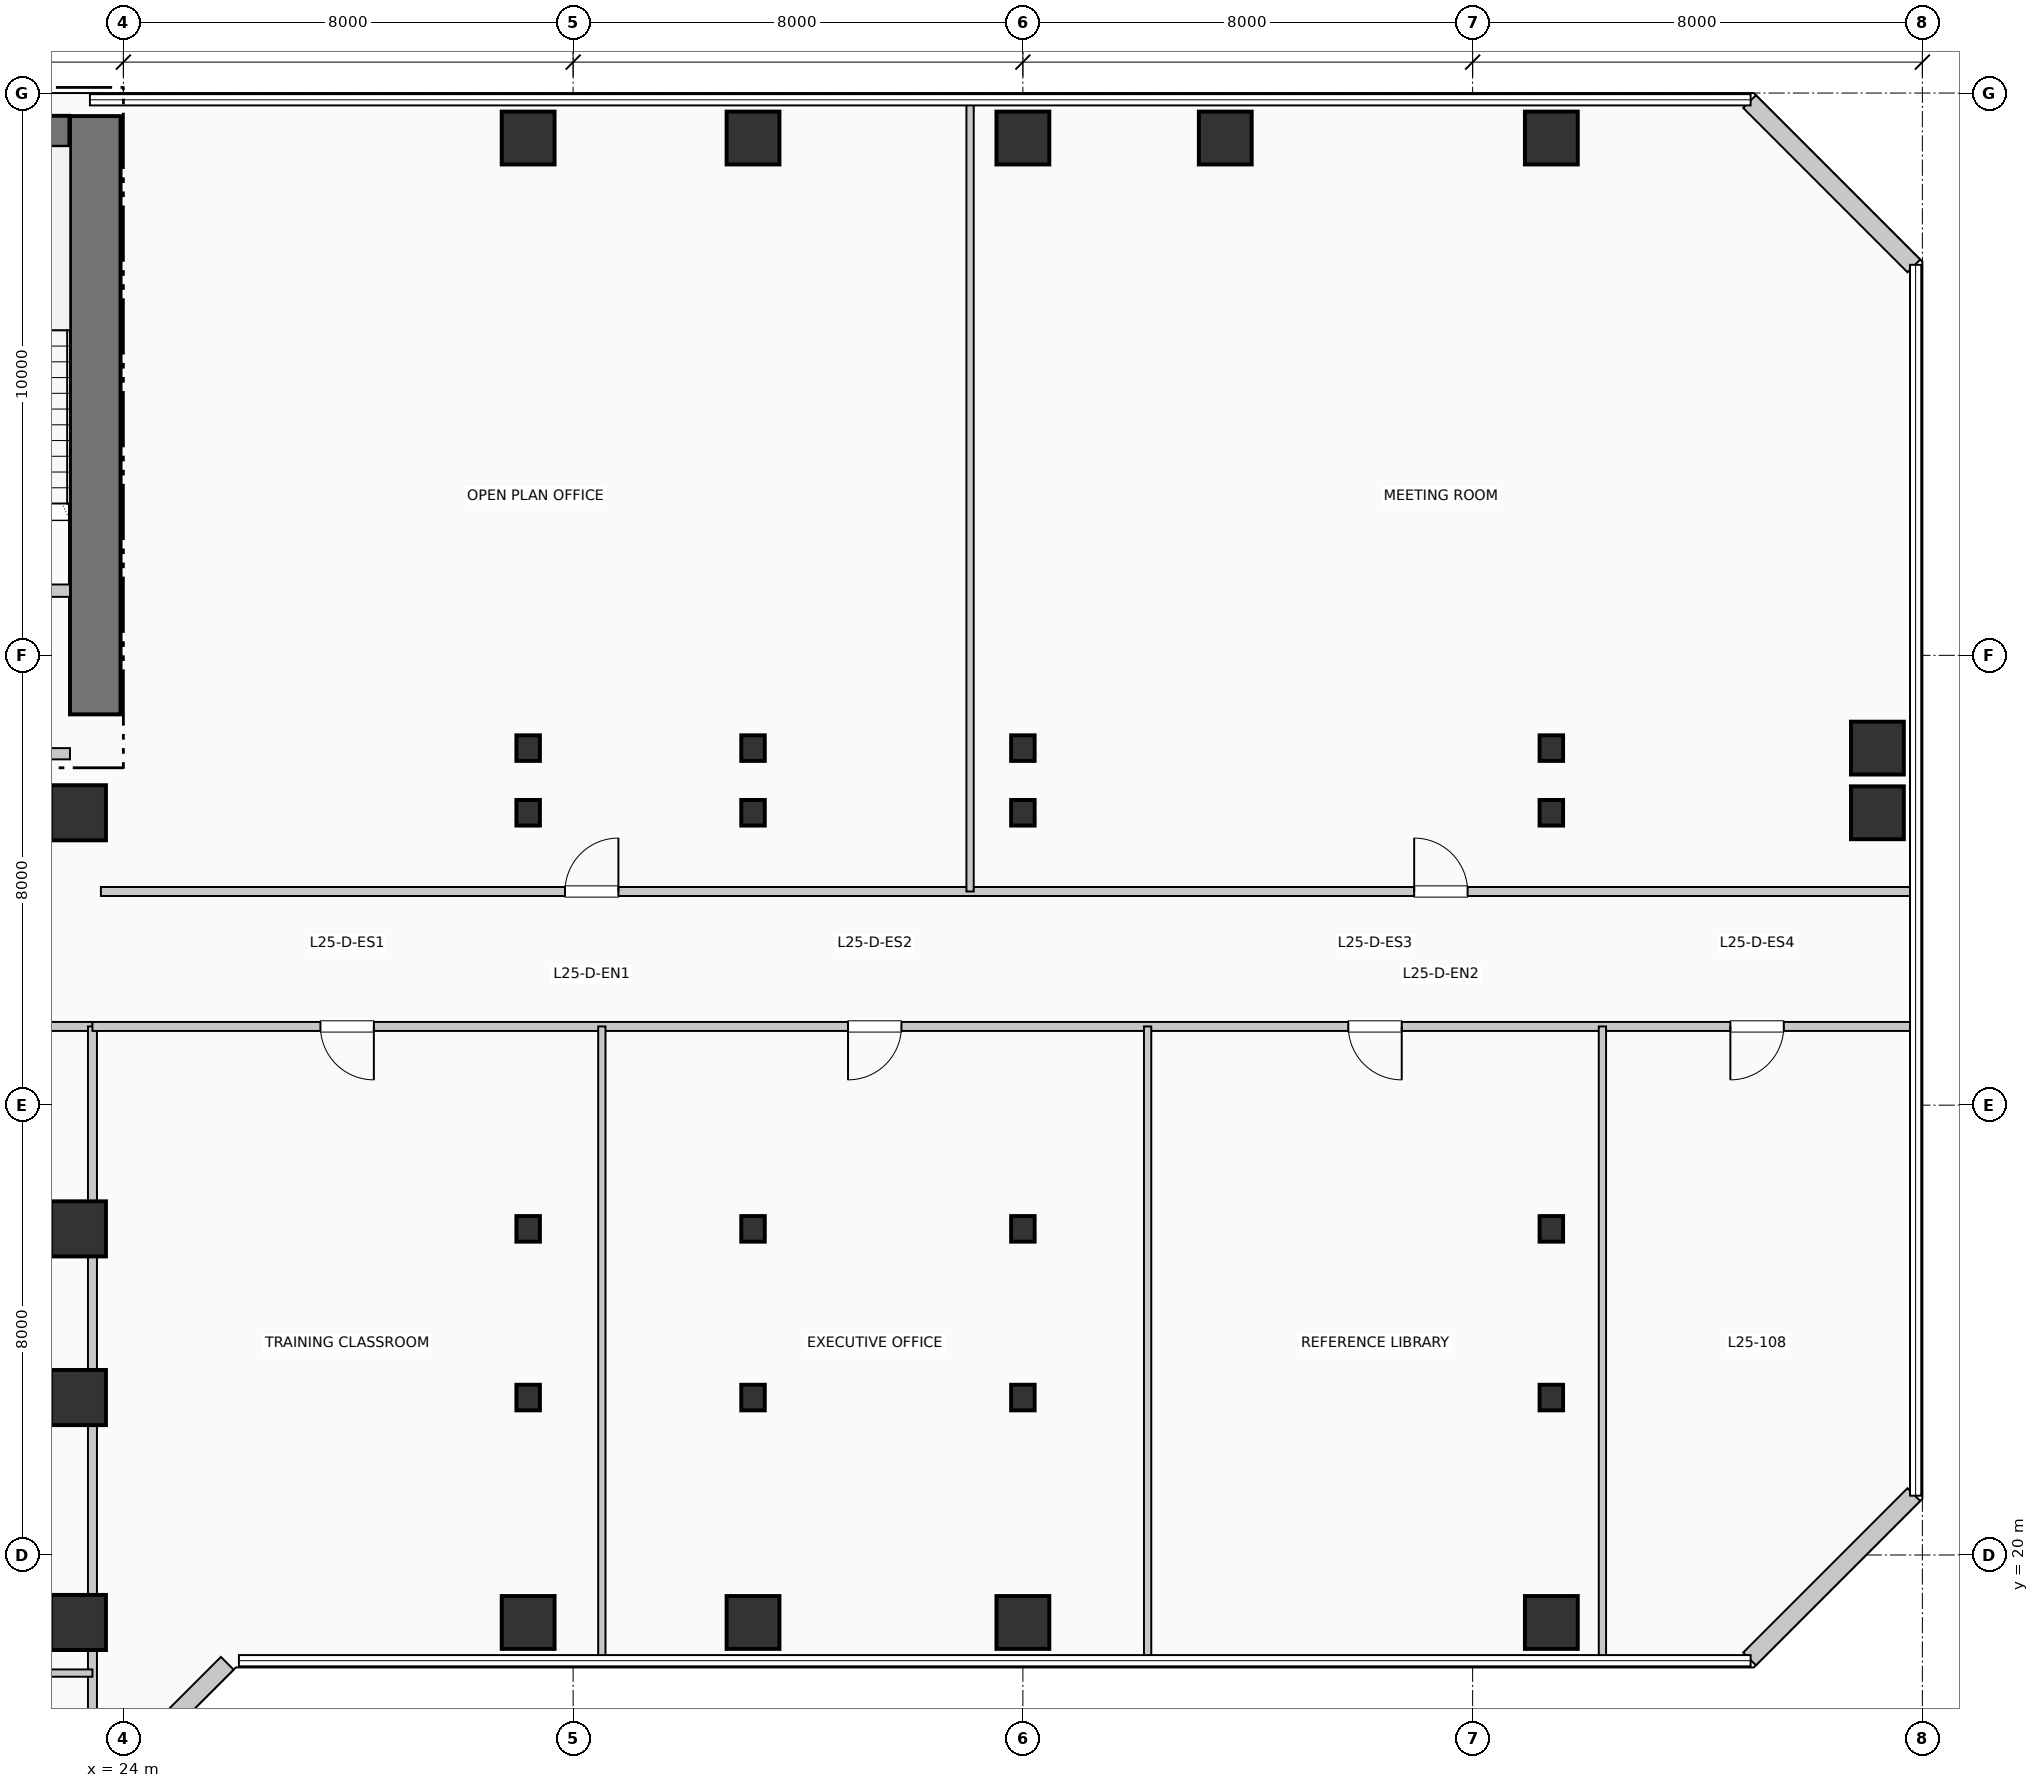
"""IFC4 building model, lengths in metres.
Left out: names, types, materials, properties, quantities, classifications, styles, units other than length and angle.
Written with IfcOpenShell. Run it as: python <this file> out.ifc"""

import sys

from ifc_helpers import new_model, si_unit, direction, frame, frame_2d, origin, origin_2d, place, context, subcontext, project, spatial, rectangle, i_section, extrude, element, fill, save


model = new_model("IFC4")
c1 = context("Model", 3, precision=1e-05, world=origin(), true_north=direction((0.0, 1.0)))
c2 = subcontext(c1, "Body", "Model", "MODEL_VIEW")
j1 = project(units=[si_unit("LENGTHUNIT", "METRE"), si_unit("PLANEANGLEUNIT", "RADIAN")], contexts=[c1])
p1 = place(None, origin())
s1 = spatial("IfcSite", under=j1, at=p1, CompositionType="ELEMENT")
p2 = place(p1, origin())
s2 = spatial("IfcBuilding", under=s1, at=p2, CompositionType="ELEMENT")
p3 = place(p2, frame((0.0, 0.0, 106.59)))
s3 = spatial("IfcBuildingStorey", under=s2, at=p3, CompositionType="ELEMENT", Elevation=106.59)
p4 = place(p3, frame((23.5, 34.95, 0.0), z_axis=(0.0, 0.0, 1.0), x_axis=(0.0, 1.0, 0.0)))
e1 = element("IfcWall", 1, at=p4, inside=s3, PredefinedType="SHEAR", context=c2, shape_type="SweptSolid", body=[
    extrude(rectangle(XDim=10.64, YDim=0.9, at=frame_2d((5.32, 0.0))), origin(), (0.0, 0.0, 1.0), 3.96),
])
p5 = place(p3, frame((19.35, 45.32, 0.0), z_axis=(0.0, 0.0, 1.0), x_axis=(1.0, 0.0, 0.0)))
e2 = element("IfcWall", 2, at=p5, inside=s3, PredefinedType="SHEAR", context=c2, shape_type="SweptSolid", body=[
    extrude(rectangle(XDim=3.69, YDim=0.55, at=frame_2d((1.845, 0.0))), origin(), (0.0, 0.0, 1.0), 3.96),
])
p6 = place(p5, frame((1.15, 0.0, 1.05)))
e3 = element("IfcOpeningElement", 3, at=p6, cuts=e2, PredefinedType="OPENING", context=c2, shape_type="SweptSolid", body=[
    extrude(rectangle(XDim=1.4, YDim=1.8, at=frame_2d((0.7, 0.9))), frame((0.0, 0.285, 0.0), z_axis=(0.0, -1.0, 0.0), x_axis=(1.0, 0.0, 0.0)), (0.0, 0.0, 1.0), 0.57),
])
for number, where, z_axis, x_axis in (
    (4, (23.2, 18.8, 0.0), (0.0, 0.0, 1.0), (1.0, 0.0, 0.0)),
    (5, (23.2, 22.8, 0.0), (0.0, 0.0, 1.0), (1.0, 0.0, 0.0)),
    (6, (23.2, 25.8, 0.0), (0.0, 0.0, 1.0), (1.0, 0.0, 0.0)),
    (7, (23.2, 33.2, 0.0), (0.0, 0.0, 1.0), (1.0, 0.0, 0.0)),
):
    element("IfcColumn", number, at=place(p3, frame(where, z_axis=z_axis, x_axis=x_axis)), inside=s3, PredefinedType="COLUMN", context=c2, shape_type="SweptSolid", body=[
        extrude(rectangle(XDim=0.98, YDim=0.98, at=origin_2d()), origin(), (0.0, 0.0, 1.0), 3.96),
    ])
p7 = place(p3, frame((31.2, 18.8, 0.0), z_axis=(0.0, 0.0, 1.0), x_axis=(1.0, 0.0, 0.0)))
e8 = element("IfcColumn", 8, at=p7, inside=s3, PredefinedType="COLUMN", context=c2, shape_type="SweptSolid", body=[
    extrude(rectangle(XDim=0.94, YDim=0.94, at=origin_2d()), origin(), (0.0, 0.0, 1.0), 3.96),
])
for number, where, z_axis, x_axis in (
    (9, (31.2, 22.8, 0.0), (0.0, 0.0, 1.0), (1.0, 0.0, 0.0)),
    (10, (31.2, 25.8, 0.0), (0.0, 0.0, 1.0), (1.0, 0.0, 0.0)),
    (11, (31.2, 33.2, 0.0), (0.0, 0.0, 1.0), (1.0, 0.0, 0.0)),
    (12, (31.2, 34.35, 0.0), (0.0, 0.0, 1.0), (1.0, 0.0, 0.0)),
):
    element("IfcColumn", number, at=place(p3, frame(where, z_axis=z_axis, x_axis=x_axis)), inside=s3, PredefinedType="COLUMN", context=c2, shape_type="SweptSolid", body=[
        extrude(i_section(OverallWidth=0.418, OverallDepth=0.455, WebThickness=0.032, FlangeThickness=0.051, at=origin_2d()), origin(), (0.0, 0.0, 1.0), 3.96),
    ])
for number, where, z_axis, x_axis in (
    (13, (31.2, 45.2, 0.0), (0.0, 0.0, 1.0), (1.0, 0.0, 0.0)),
    (14, (35.2, 18.8, 0.0), (0.0, 0.0, 1.0), (1.0, 0.0, 0.0)),
):
    element("IfcColumn", number, at=place(p3, frame(where, z_axis=z_axis, x_axis=x_axis)), inside=s3, PredefinedType="COLUMN", context=c2, shape_type="SweptSolid", body=[
        extrude(rectangle(XDim=0.94, YDim=0.94, at=origin_2d()), origin(), (0.0, 0.0, 1.0), 3.96),
    ])
for number, where, z_axis, x_axis in (
    (15, (35.2, 22.8, 0.0), (0.0, 0.0, 1.0), (1.0, 0.0, 0.0)),
    (16, (35.2, 25.8, 0.0), (0.0, 0.0, 1.0), (1.0, 0.0, 0.0)),
    (17, (35.2, 33.2, 0.0), (0.0, 0.0, 1.0), (1.0, 0.0, 0.0)),
    (18, (35.2, 34.35, 0.0), (0.0, 0.0, 1.0), (1.0, 0.0, 0.0)),
):
    element("IfcColumn", number, at=place(p3, frame(where, z_axis=z_axis, x_axis=x_axis)), inside=s3, PredefinedType="COLUMN", context=c2, shape_type="SweptSolid", body=[
        extrude(i_section(OverallWidth=0.418, OverallDepth=0.455, WebThickness=0.032, FlangeThickness=0.051, at=origin_2d()), origin(), (0.0, 0.0, 1.0), 3.96),
    ])
for number, where, z_axis, x_axis in (
    (19, (35.2, 45.2, 0.0), (0.0, 0.0, 1.0), (1.0, 0.0, 0.0)),
    (20, (40.0, 18.8, 0.0), (0.0, 0.0, 1.0), (1.0, 0.0, 0.0)),
):
    element("IfcColumn", number, at=place(p3, frame(where, z_axis=z_axis, x_axis=x_axis)), inside=s3, PredefinedType="COLUMN", context=c2, shape_type="SweptSolid", body=[
        extrude(rectangle(XDim=0.94, YDim=0.94, at=origin_2d()), origin(), (0.0, 0.0, 1.0), 3.96),
    ])
for number, where, z_axis, x_axis in (
    (21, (40.0, 22.8, 0.0), (0.0, 0.0, 1.0), (1.0, 0.0, 0.0)),
    (22, (40.0, 25.8, 0.0), (0.0, 0.0, 1.0), (1.0, 0.0, 0.0)),
    (23, (40.0, 33.2, 0.0), (0.0, 0.0, 1.0), (1.0, 0.0, 0.0)),
    (24, (40.0, 34.35, 0.0), (0.0, 0.0, 1.0), (1.0, 0.0, 0.0)),
):
    element("IfcColumn", number, at=place(p3, frame(where, z_axis=z_axis, x_axis=x_axis)), inside=s3, PredefinedType="COLUMN", context=c2, shape_type="SweptSolid", body=[
        extrude(i_section(OverallWidth=0.418, OverallDepth=0.455, WebThickness=0.032, FlangeThickness=0.051, at=origin_2d()), origin(), (0.0, 0.0, 1.0), 3.96),
    ])
for number, where, z_axis, x_axis in (
    (25, (40.0, 45.2, 0.0), (0.0, 0.0, 1.0), (1.0, 0.0, 0.0)),
    (26, (43.6, 45.2, 0.0), (0.0, 0.0, 1.0), (1.0, 0.0, 0.0)),
    (27, (49.4, 18.8, 0.0), (0.0, 0.0, 1.0), (1.0, 0.0, 0.0)),
):
    element("IfcColumn", number, at=place(p3, frame(where, z_axis=z_axis, x_axis=x_axis)), inside=s3, PredefinedType="COLUMN", context=c2, shape_type="SweptSolid", body=[
        extrude(rectangle(XDim=0.94, YDim=0.94, at=origin_2d()), origin(), (0.0, 0.0, 1.0), 3.96),
    ])
for number, where, z_axis, x_axis in (
    (28, (49.4, 22.8, 0.0), (0.0, 0.0, 1.0), (1.0, 0.0, 0.0)),
    (29, (49.4, 25.8, 0.0), (0.0, 0.0, 1.0), (1.0, 0.0, 0.0)),
    (30, (49.4, 33.2, 0.0), (0.0, 0.0, 1.0), (1.0, 0.0, 0.0)),
    (31, (49.4, 34.35, 0.0), (0.0, 0.0, 1.0), (1.0, 0.0, 0.0)),
):
    element("IfcColumn", number, at=place(p3, frame(where, z_axis=z_axis, x_axis=x_axis)), inside=s3, PredefinedType="COLUMN", context=c2, shape_type="SweptSolid", body=[
        extrude(i_section(OverallWidth=0.418, OverallDepth=0.455, WebThickness=0.032, FlangeThickness=0.051, at=origin_2d()), origin(), (0.0, 0.0, 1.0), 3.96),
    ])
for number, where, z_axis, x_axis in (
    (32, (49.4, 45.2, 0.0), (0.0, 0.0, 1.0), (1.0, 0.0, 0.0)),
    (33, (55.2, 33.2, 0.0), (0.0, 0.0, 1.0), (1.0, 0.0, 0.0)),
    (34, (55.2, 34.35, 0.0), (0.0, 0.0, 1.0), (1.0, 0.0, 0.0)),
):
    element("IfcColumn", number, at=place(p3, frame(where, z_axis=z_axis, x_axis=x_axis)), inside=s3, PredefinedType="COLUMN", context=c2, shape_type="SweptSolid", body=[
        extrude(rectangle(XDim=0.94, YDim=0.94, at=origin_2d()), origin(), (0.0, 0.0, 1.0), 3.96),
    ])
p8 = place(p3, frame((23.926, 16.152, 0.0), z_axis=(0.0, 0.0, 1.0), x_axis=(0.707106781187, 0.707106781187, 0.0)))
e35 = element("IfcWall", 35, at=p8, inside=s3, PredefinedType="SOLIDWALL", context=c2, shape_type="SweptSolid", body=[
    extrude(rectangle(XDim=2.718, YDim=0.32, at=frame_2d((1.359, 0.0))), origin(), (0.0, 0.0, 1.0), 3.71),
])
for number, where, z_axis, x_axis in (
    (36, (52.926, 18.152, 0.0), (0.0, 0.0, 1.0), (0.707, 0.707, 0.0)),
    (37, (55.848, 42.926, 0.0), (0.0, 0.0, 1.0), (-0.707, 0.707, 0.0)),
):
    element("IfcWall", number, at=place(p3, frame(where, z_axis=z_axis, x_axis=x_axis)), inside=s3, PredefinedType="SOLIDWALL", context=c2, shape_type="SweptSolid", body=[
        extrude(rectangle(XDim=4.133, YDim=0.32, at=frame_2d((2.066, 0.0))), origin(), (0.0, 0.0, 1.0), 3.71),
    ])
p9 = place(p3, frame((19.9, 37.15, 0.0), z_axis=(0.0, 0.0, 1.0), x_axis=(1.0, 0.0, 0.0)))
e38 = element("IfcWall", 38, at=p9, inside=s3, PredefinedType="PARTITIONING", context=c2, shape_type="SweptSolid", body=[
    extrude(rectangle(XDim=3.15, YDim=0.22, at=frame_2d((1.575, 0.0))), origin(), (0.0, 0.0, 1.0), 3.71),
])
p10 = place(p9, frame((2.05, 0.0, 0.0), z_axis=(0.0, 0.0, 1.0), x_axis=(-1.0, 0.0, 0.0)))
e39 = element("IfcOpeningElement", 39, at=p10, cuts=e38, PredefinedType="OPENING", context=c2, shape_type="SweptSolid", body=[
    extrude(rectangle(XDim=1.05, YDim=2.15, at=frame_2d((0.525, 1.075))), frame((0.0, 0.12, 0.0), z_axis=(0.0, -1.0, 0.0), x_axis=(1.0, 0.0, 0.0)), (0.0, 0.0, 1.0), 0.24),
])
p11 = place(p3, frame((19.8, 34.25, 0.0), z_axis=(0.0, 0.0, 1.0), x_axis=(1.0, 0.0, 0.0)))
e40 = element("IfcWall", 40, at=p11, inside=s3, PredefinedType="PARTITIONING", context=c2, shape_type="SweptSolid", body=[
    extrude(rectangle(XDim=3.25, YDim=0.2, at=frame_2d((1.625, 0.0))), origin(), (0.0, 0.0, 1.0), 3.71),
])
p12 = place(p11, frame((2.15, 0.0, 0.0), z_axis=(0.0, 0.0, 1.0), x_axis=(-1.0, 0.0, 0.0)))
e41 = element("IfcOpeningElement", 41, at=p12, cuts=e40, PredefinedType="OPENING", context=c2, shape_type="SweptSolid", body=[
    extrude(rectangle(XDim=1.1, YDim=2.15, at=frame_2d((0.55, 1.075))), frame((0.0, 0.11, 0.0), z_axis=(0.0, -1.0, 0.0), x_axis=(1.0, 0.0, 0.0)), (0.0, 0.0, 1.0), 0.22),
])
p13 = place(p3, frame((11.64, 29.4, 0.0), z_axis=(0.0, 0.0, 1.0), x_axis=(1.0, 0.0, 0.0)))
e42 = element("IfcWall", 42, at=p13, inside=s3, PredefinedType="PARTITIONING", context=c2, shape_type="SweptSolid", body=[
    extrude(rectangle(XDim=11.81, YDim=0.16, at=frame_2d((5.905, 0.0))), origin(), (0.0, 0.0, 1.0), 3.71),
])
p14 = place(p3, frame((23.45, 0.19, 0.0), z_axis=(0.0, 0.0, 1.0), x_axis=(0.0, 1.0, 0.0)))
e43 = element("IfcWall", 43, at=p14, inside=s3, PredefinedType="PARTITIONING", context=c2, shape_type="SweptSolid", body=[
    extrude(rectangle(XDim=29.21, YDim=0.16, at=frame_2d((14.605, 0.0))), origin(), (0.0, 0.0, 1.0), 2.995),
])
p15 = place(p3, frame((11.64, 17.9, 0.0), z_axis=(0.0, 0.0, 1.0), x_axis=(1.0, 0.0, 0.0)))
e44 = element("IfcWall", 44, at=p15, inside=s3, PredefinedType="PARTITIONING", context=c2, shape_type="SweptSolid", body=[
    extrude(rectangle(XDim=11.81, YDim=0.13, at=frame_2d((5.905, 0.0))), origin(), (0.0, 0.0, 1.0), 3.71),
])
p16 = place(p3, frame((23.45, 29.4, 0.0), z_axis=(0.0, 0.0, 1.0), x_axis=(1.0, 0.0, 0.0)))
e45 = element("IfcWall", 45, at=p16, inside=s3, PredefinedType="PARTITIONING", context=c2, shape_type="SweptSolid", body=[
    extrude(rectangle(XDim=32.36, YDim=0.16, at=frame_2d((16.18, 0.0))), origin(), (0.0, 0.0, 1.0), 3.365),
])
p17 = place(p16, frame((5.005, 0.0, 0.0), z_axis=(0.0, 0.0, 1.0), x_axis=(-1.0, 0.0, 0.0)))
e46 = element("IfcOpeningElement", 46, at=p17, cuts=e45, PredefinedType="OPENING", context=c2, shape_type="SweptSolid", body=[
    extrude(rectangle(XDim=0.95, YDim=2.15, at=frame_2d((0.475, 1.075))), frame((0.0, 0.09, 0.0), z_axis=(0.0, -1.0, 0.0), x_axis=(1.0, 0.0, 0.0)), (0.0, 0.0, 1.0), 0.18),
])
p18 = place(p16, frame((14.39, 0.0, 0.0), z_axis=(0.0, 0.0, 1.0), x_axis=(-1.0, 0.0, 0.0)))
e47 = element("IfcOpeningElement", 47, at=p18, cuts=e45, PredefinedType="OPENING", context=c2, shape_type="SweptSolid", body=[
    extrude(rectangle(XDim=0.95, YDim=2.15, at=frame_2d((0.475, 1.075))), frame((0.0, 0.09, 0.0), z_axis=(0.0, -1.0, 0.0), x_axis=(1.0, 0.0, 0.0)), (0.0, 0.0, 1.0), 0.18),
])
p19 = place(p16, frame((23.289, 0.0, 0.0), z_axis=(0.0, 0.0, 1.0), x_axis=(-1.0, 0.0, 0.0)))
e48 = element("IfcOpeningElement", 48, at=p19, cuts=e45, PredefinedType="OPENING", context=c2, shape_type="SweptSolid", body=[
    extrude(rectangle(XDim=0.95, YDim=2.15, at=frame_2d((0.475, 1.075))), frame((0.0, 0.09, 0.0), z_axis=(0.0, -1.0, 0.0), x_axis=(1.0, 0.0, 0.0)), (0.0, 0.0, 1.0), 0.18),
])
p20 = place(p16, frame((30.084, 0.0, 0.0), z_axis=(0.0, 0.0, 1.0), x_axis=(-1.0, 0.0, 0.0)))
e49 = element("IfcOpeningElement", 49, at=p20, cuts=e45, PredefinedType="OPENING", context=c2, shape_type="SweptSolid", body=[
    extrude(rectangle(XDim=0.95, YDim=2.15, at=frame_2d((0.475, 1.075))), frame((0.0, 0.09, 0.0), z_axis=(0.0, -1.0, 0.0), x_axis=(1.0, 0.0, 0.0)), (0.0, 0.0, 1.0), 0.18),
])
p21 = place(p3, frame((23.6, 31.8, 0.0), z_axis=(0.0, 0.0, 1.0), x_axis=(1.0, 0.0, 0.0)))
e50 = element("IfcWall", 50, at=p21, inside=s3, PredefinedType="PARTITIONING", context=c2, shape_type="SweptSolid", body=[
    extrude(rectangle(XDim=32.21, YDim=0.16, at=frame_2d((16.105, 0.0))), origin(), (0.0, 0.0, 1.0), 3.71),
])
p22 = place(p21, frame((8.255, 0.0, 0.0)))
e51 = element("IfcOpeningElement", 51, at=p22, cuts=e50, PredefinedType="OPENING", context=c2, shape_type="SweptSolid", body=[
    extrude(rectangle(XDim=0.95, YDim=2.15, at=frame_2d((0.475, 1.075))), frame((0.0, 0.09, 0.0), z_axis=(0.0, -1.0, 0.0), x_axis=(1.0, 0.0, 0.0)), (0.0, 0.0, 1.0), 0.18),
])
p23 = place(p21, frame((23.36, 0.0, 0.0)))
e52 = element("IfcOpeningElement", 52, at=p23, cuts=e50, PredefinedType="OPENING", context=c2, shape_type="SweptSolid", body=[
    extrude(rectangle(XDim=0.95, YDim=2.15, at=frame_2d((0.475, 1.075))), frame((0.0, 0.09, 0.0), z_axis=(0.0, -1.0, 0.0), x_axis=(1.0, 0.0, 0.0)), (0.0, 0.0, 1.0), 0.18),
])
for number, where, z_axis, x_axis in (
    (53, (32.511, 18.19, 0.0), (0.0, 0.0, 1.0), (0.0, 1.0, 0.0)),
    (54, (42.219, 18.19, 0.0), (0.0, 0.0, 1.0), (0.0, 1.0, 0.0)),
    (55, (50.309, 18.19, 0.0), (0.0, 0.0, 1.0), (0.0, 1.0, 0.0)),
):
    element("IfcWall", number, at=place(p3, frame(where, z_axis=z_axis, x_axis=x_axis)), inside=s3, PredefinedType="PARTITIONING", context=c2, shape_type="SweptSolid", body=[
        extrude(rectangle(XDim=11.21, YDim=0.13, at=frame_2d((5.605, 0.0))), origin(), (0.0, 0.0, 1.0), 3.71),
    ])
p24 = place(p3, frame((39.061, 31.8, 0.0), z_axis=(0.0, 0.0, 1.0), x_axis=(0.0, 1.0, 0.0)))
e56 = element("IfcWall", 56, at=p24, inside=s3, PredefinedType="PARTITIONING", context=c2, shape_type="SweptSolid", body=[
    extrude(rectangle(XDim=14.01, YDim=0.13, at=frame_2d((7.005, 0.0))), origin(), (0.0, 0.0, 1.0), 3.71),
])
p25 = place(p17, origin())
e57 = element("IfcDoor", 57, at=p25, inside=s3, OperationType="SINGLE_SWING_RIGHT", PredefinedType="DOOR", context=c2, shape_type="SweptSolid", body=[
    extrude(rectangle(XDim=0.95, YDim=2.15, at=frame_2d((0.475, 1.075))), frame((0.0, 0.025, 0.0), z_axis=(0.0, -1.0, 0.0), x_axis=(1.0, 0.0, 0.0)), (0.0, 0.0, 1.0), 0.05),
])
fill(e46, e57)
p26 = place(p18, origin())
e58 = element("IfcDoor", 58, at=p26, inside=s3, OperationType="SINGLE_SWING_LEFT", PredefinedType="DOOR", context=c2, shape_type="SweptSolid", body=[
    extrude(rectangle(XDim=0.95, YDim=2.15, at=frame_2d((0.475, 1.075))), frame((0.0, 0.025, 0.0), z_axis=(0.0, -1.0, 0.0), x_axis=(1.0, 0.0, 0.0)), (0.0, 0.0, 1.0), 0.05),
])
fill(e47, e58)
p27 = place(p19, origin())
e59 = element("IfcDoor", 59, at=p27, inside=s3, OperationType="SINGLE_SWING_RIGHT", PredefinedType="DOOR", context=c2, shape_type="SweptSolid", body=[
    extrude(rectangle(XDim=0.95, YDim=2.15, at=frame_2d((0.475, 1.075))), frame((0.0, 0.025, 0.0), z_axis=(0.0, -1.0, 0.0), x_axis=(1.0, 0.0, 0.0)), (0.0, 0.0, 1.0), 0.05),
])
fill(e48, e59)
p28 = place(p20, origin())
e60 = element("IfcDoor", 60, at=p28, inside=s3, OperationType="SINGLE_SWING_LEFT", PredefinedType="DOOR", context=c2, shape_type="SweptSolid", body=[
    extrude(rectangle(XDim=0.95, YDim=2.15, at=frame_2d((0.475, 1.075))), frame((0.0, 0.025, 0.0), z_axis=(0.0, -1.0, 0.0), x_axis=(1.0, 0.0, 0.0)), (0.0, 0.0, 1.0), 0.05),
])
fill(e49, e60)
p29 = place(p22, origin())
e61 = element("IfcDoor", 61, at=p29, inside=s3, OperationType="SINGLE_SWING_RIGHT", PredefinedType="DOOR", context=c2, shape_type="SweptSolid", body=[
    extrude(rectangle(XDim=0.95, YDim=2.15, at=frame_2d((0.475, 1.075))), frame((0.0, 0.025, 0.0), z_axis=(0.0, -1.0, 0.0), x_axis=(1.0, 0.0, 0.0)), (0.0, 0.0, 1.0), 0.05),
])
fill(e51, e61)
p30 = place(p23, origin())
e62 = element("IfcDoor", 62, at=p30, inside=s3, OperationType="SINGLE_SWING_LEFT", PredefinedType="DOOR", context=c2, shape_type="SweptSolid", body=[
    extrude(rectangle(XDim=0.95, YDim=2.15, at=frame_2d((0.475, 1.075))), frame((0.0, 0.025, 0.0), z_axis=(0.0, -1.0, 0.0), x_axis=(1.0, 0.0, 0.0)), (0.0, 0.0, 1.0), 0.05),
])
fill(e52, e62)
save(model, sys.argv[1])
